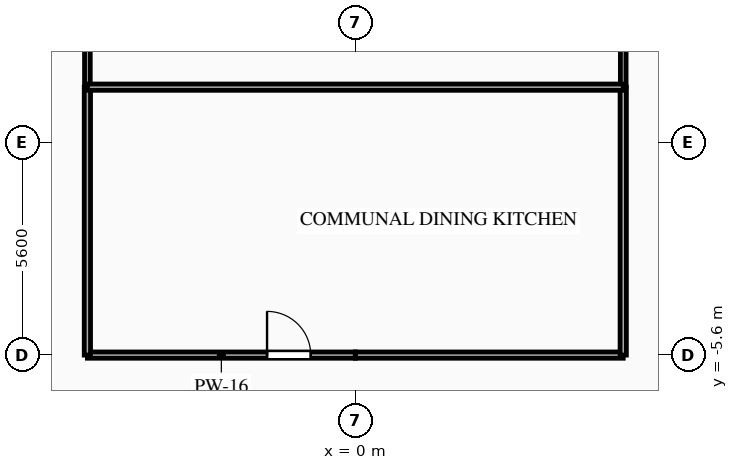
"""IFC4 building model, lengths in metres.
Left out: names, types, materials, properties, quantities, classifications, styles, units other than length and angle.
Written with IfcOpenShell. Run it as: python <this file> out.ifc"""

import sys

from ifc_helpers import new_model, si_unit, direction, frame, frame_2d, origin, place, context, subcontext, project, spatial, rectangle, extrude, element, fill, save


model = new_model("IFC4")
c1 = context("Model", 3, precision=1e-05, world=origin(), true_north=direction((0.0, 1.0)))
c2 = subcontext(c1, "Body", "Model", "MODEL_VIEW")
j1 = project(units=[si_unit("LENGTHUNIT", "METRE"), si_unit("PLANEANGLEUNIT", "RADIAN")], contexts=[c1])
p1 = place(None, origin())
s1 = spatial("IfcSite", under=j1, at=p1, CompositionType="ELEMENT")
p2 = place(p1, origin())
s2 = spatial("IfcBuilding", under=s1, at=p2, CompositionType="ELEMENT")
p3 = place(p2, frame((0.0, 0.0, 43.75)))
s3 = spatial("IfcBuildingStorey", under=s2, at=p3, CompositionType="ELEMENT", Elevation=43.75)
p4 = place(p3, frame((-7.05, -5.6, 0.0), z_axis=(0.0, 0.0, 1.0), x_axis=(1.0, 0.0, 0.0)))
e1 = element("IfcWall", 1, at=p4, inside=s3, PredefinedType="PARTITIONING", context=c2, shape_type="SweptSolid", body=[
    extrude(rectangle(XDim=7.05, YDim=0.165, at=frame_2d((3.525, 0.0))), origin(), (0.0, 0.0, 1.0), 2.52),
])
p5 = place(p4, frame((4.728, 0.0, 0.0)))
e2 = element("IfcOpeningElement", 2, at=p5, cuts=e1, PredefinedType="OPENING", context=c2, shape_type="SweptSolid", body=[
    extrude(rectangle(XDim=1.15, YDim=2.15, at=frame_2d((0.575, 1.075))), frame((0.0, 0.093, 0.0), z_axis=(0.0, -1.0, 0.0), x_axis=(1.0, 0.0, 0.0)), (0.0, 0.0, 1.0), 0.185),
])
p6 = place(p3, frame((0.0, -5.6, 0.0), z_axis=(0.0, 0.0, 1.0), x_axis=(1.0, 0.0, 0.0)))
e3 = element("IfcWall", 3, at=p6, inside=s3, PredefinedType="PARTITIONING", context=c2, shape_type="SweptSolid", body=[
    extrude(rectangle(XDim=7.05, YDim=0.165, at=frame_2d((3.525, 0.0))), origin(), (0.0, 0.0, 1.0), 2.52),
])
p7 = place(p3, frame((-7.05, 1.45, 0.0), z_axis=(0.0, 0.0, 1.0), x_axis=(0.0, -1.0, 0.0)))
e4 = element("IfcWall", 4, at=p7, inside=s3, PredefinedType="PARTITIONING", context=c2, shape_type="SweptSolid", body=[
    extrude(rectangle(XDim=7.05, YDim=0.165, at=frame_2d((3.525, 0.0))), origin(), (0.0, 0.0, 1.0), 3.035),
])
p8 = place(p3, frame((-7.05, 8.5, 0.0), z_axis=(0.0, 0.0, 1.0), x_axis=(0.0, -1.0, 0.0)))
e5 = element("IfcWall", 5, at=p8, inside=s3, PredefinedType="PARTITIONING", context=c2, shape_type="SweptSolid", body=[
    extrude(rectangle(XDim=7.05, YDim=0.15, at=frame_2d((3.525, 0.0))), origin(), (0.0, 0.0, 1.0), 3.035),
])
p9 = place(p3, frame((7.05, -5.6, 0.0), z_axis=(0.0, 0.0, 1.0), x_axis=(0.0, 1.0, 0.0)))
e6 = element("IfcWall", 6, at=p9, inside=s3, PredefinedType="PARTITIONING", context=c2, shape_type="SweptSolid", body=[
    extrude(rectangle(XDim=7.05, YDim=0.165, at=frame_2d((3.525, 0.0))), origin(), (0.0, 0.0, 1.0), 3.035),
])
p10 = place(p3, frame((7.05, 1.45, 0.0), z_axis=(0.0, 0.0, 1.0), x_axis=(0.0, 1.0, 0.0)))
e7 = element("IfcWall", 7, at=p10, inside=s3, PredefinedType="PARTITIONING", context=c2, shape_type="SweptSolid", body=[
    extrude(rectangle(XDim=7.05, YDim=0.15, at=frame_2d((3.525, 0.0))), origin(), (0.0, 0.0, 1.0), 3.035),
])
p11 = place(p3, frame((-7.05, 1.45, 0.0), z_axis=(0.0, 0.0, 1.0), x_axis=(1.0, 0.0, 0.0)))
e8 = element("IfcWall", 8, at=p11, inside=s3, PredefinedType="PARTITIONING", context=c2, shape_type="SweptSolid", body=[
    extrude(rectangle(XDim=14.1, YDim=0.165, at=frame_2d((7.05, 0.0))), origin(), (0.0, 0.0, 1.0), 3.035),
])
p12 = place(p5, origin())
e9 = element("IfcDoor", 9, at=p12, inside=s3, OperationType="SINGLE_SWING_LEFT", PredefinedType="DOOR", context=c2, shape_type="SweptSolid", body=[
    extrude(rectangle(XDim=1.15, YDim=2.15, at=frame_2d((0.575, 1.075))), frame((0.0, 0.025, 0.0), z_axis=(0.0, -1.0, 0.0), x_axis=(1.0, 0.0, 0.0)), (0.0, 0.0, 1.0), 0.05),
])
fill(e2, e9)
save(model, sys.argv[1])
